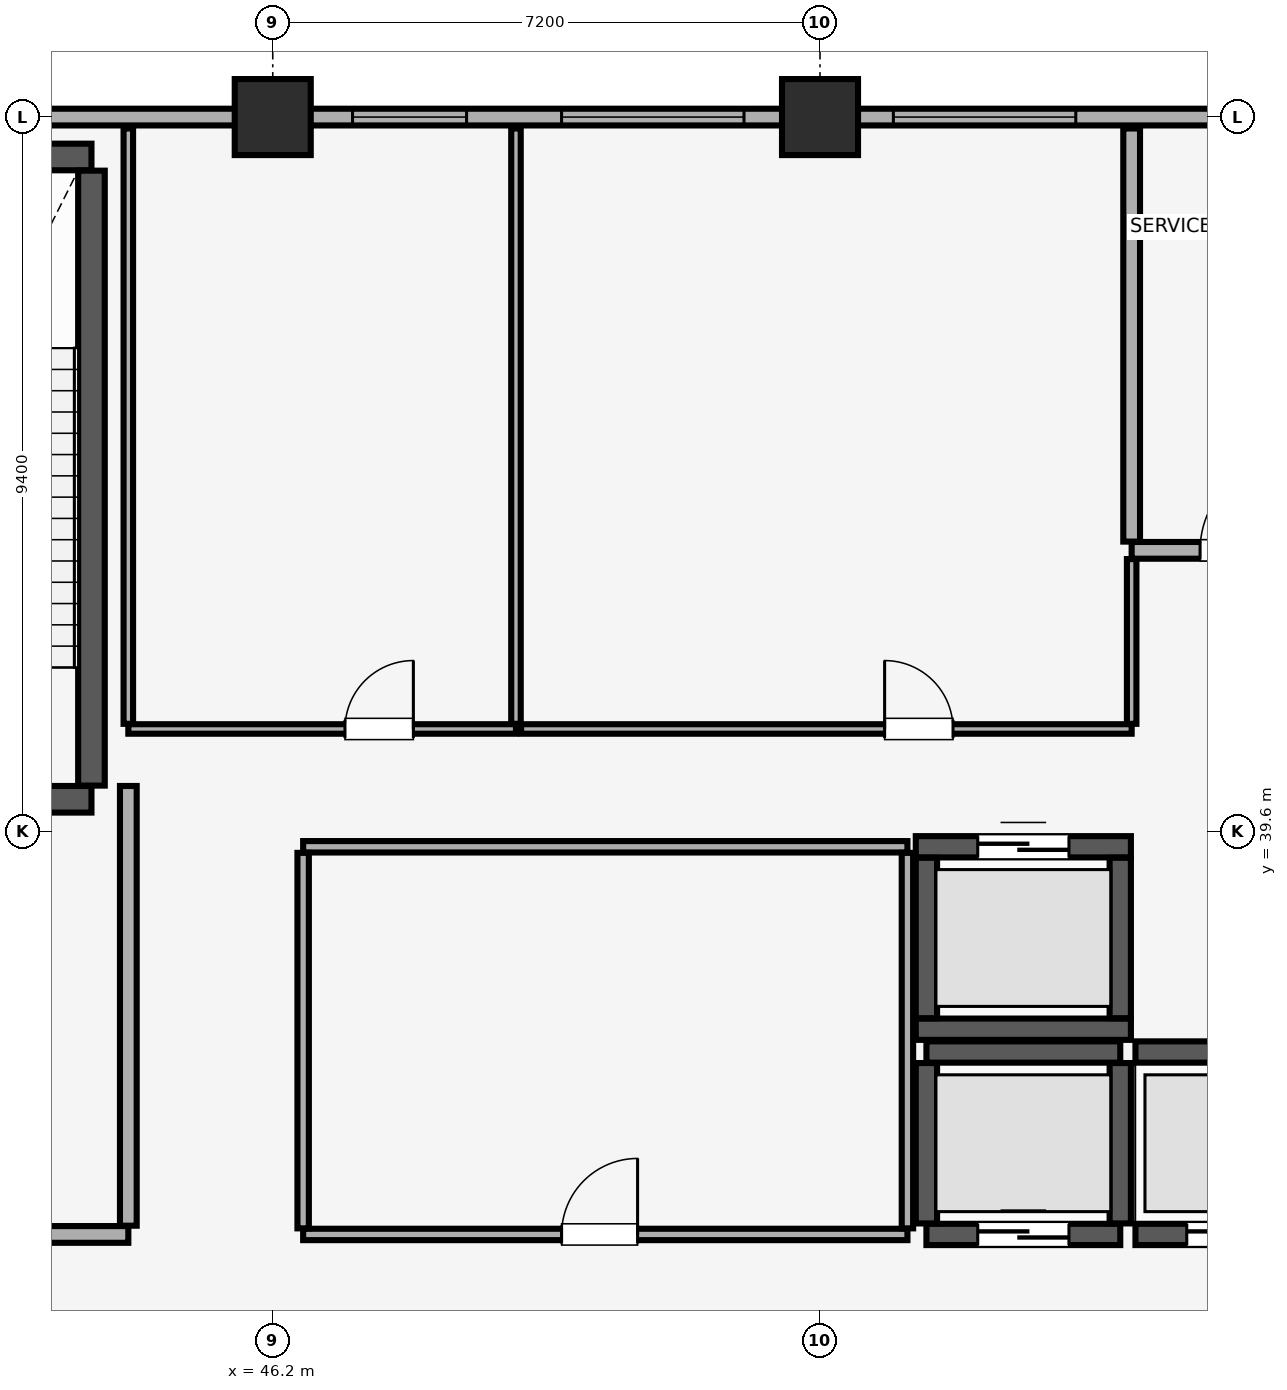
"""IFC4 building model, lengths in metres.
Left out: names, types, materials, properties, quantities, classifications, styles, units other than length and angle.
Written with IfcOpenShell. Run it as: python <this file> out.ifc"""

import sys

from ifc_helpers import new_model, si_unit, direction, frame, frame_2d, origin, origin_2d, place, context, subcontext, project, spatial, rectangle, extrude, element, fill, save


model = new_model("IFC4")
c1 = context("Model", 3, precision=1e-05, world=origin(), true_north=direction((0.0, 1.0)))
c2 = subcontext(c1, "Body", "Model", "MODEL_VIEW")
j1 = project(units=[si_unit("LENGTHUNIT", "METRE"), si_unit("PLANEANGLEUNIT", "RADIAN")], contexts=[c1])
p1 = place(None, origin())
s1 = spatial("IfcSite", under=j1, at=p1, CompositionType="ELEMENT")
p2 = place(p1, origin())
s2 = spatial("IfcBuilding", under=s1, at=p2, CompositionType="ELEMENT")
p3 = place(p2, frame((0.0, 0.0, 294.7)))
s3 = spatial("IfcBuildingStorey", under=s2, at=p3, CompositionType="ELEMENT", Elevation=294.7)
for number, where, z_axis, x_axis in (
    (1, (46.2, 49.0, 0.0), (0.0, 0.0, 1.0), (1.0, 0.0, 0.0)),
    (2, (53.4, 49.0, 0.0), (0.0, 0.0, 1.0), (1.0, 0.0, 0.0)),
):
    element("IfcColumn", number, at=place(p3, frame(where, z_axis=z_axis, x_axis=x_axis)), inside=s3, PredefinedType="COLUMN", context=c2, shape_type="SweptSolid", body=[
        extrude(rectangle(XDim=1.0, YDim=1.0, at=origin_2d()), origin(), (0.0, 0.0, 1.0), 5.12),
    ])
p4 = place(p3, frame((71.4, 49.0, 0.0), z_axis=(0.0, 0.0, 1.0), x_axis=(-1.0, 0.0, 0.0)))
e3 = element("IfcWall", 3, at=p4, inside=s3, PredefinedType="SOLIDWALL", context=c2, shape_type="SweptSolid", body=[
    extrude(rectangle(XDim=58.8, YDim=0.22, at=frame_2d((29.4, 0.0))), origin(), (0.0, 0.0, 1.0), 4.32),
])
p5 = place(p4, frame((56.365, 0.0, 0.85)))
e4 = element("IfcOpeningElement", 4, at=p5, cuts=e3, PredefinedType="OPENING", context=c2, shape_type="SweptSolid", body=[
    extrude(rectangle(XDim=1.5, YDim=1.4, at=frame_2d((0.75, 0.7))), frame((0.0, 0.12, 0.0), z_axis=(0.0, -1.0, 0.0), x_axis=(1.0, 0.0, 0.0)), (0.0, 0.0, 1.0), 0.24),
])
p6 = place(p4, frame((0.935, 0.0, 0.85)))
e5 = element("IfcOpeningElement", 5, at=p6, cuts=e3, PredefinedType="OPENING", context=c2, shape_type="SweptSolid", body=[
    extrude(rectangle(XDim=1.5, YDim=1.4, at=frame_2d((0.75, 0.7))), frame((0.0, 0.12, 0.0), z_axis=(0.0, -1.0, 0.0), x_axis=(1.0, 0.0, 0.0)), (0.0, 0.0, 1.0), 0.24),
])
p7 = place(p4, frame((43.865, 0.0, 0.9)))
e6 = element("IfcOpeningElement", 6, at=p7, cuts=e3, PredefinedType="OPENING", context=c2, shape_type="SweptSolid", body=[
    extrude(rectangle(XDim=1.5, YDim=1.4, at=frame_2d((0.75, 0.7))), frame((0.0, 0.12, 0.0), z_axis=(0.0, -1.0, 0.0), x_axis=(1.0, 0.0, 0.0)), (0.0, 0.0, 1.0), 0.24),
])
p8 = place(p4, frame((36.05, 0.0, 0.9)))
e7 = element("IfcOpeningElement", 7, at=p8, cuts=e3, PredefinedType="OPENING", context=c2, shape_type="SweptSolid", body=[
    extrude(rectangle(XDim=3.6, YDim=1.5, at=frame_2d((1.8, 0.75))), frame((0.0, 0.12, 0.0), z_axis=(0.0, -1.0, 0.0), x_axis=(1.0, 0.0, 0.0)), (0.0, 0.0, 1.0), 0.24),
])
p9 = place(p4, frame((22.65, 0.0, 0.9)))
e8 = element("IfcOpeningElement", 8, at=p9, cuts=e3, PredefinedType="OPENING", context=c2, shape_type="SweptSolid", body=[
    extrude(rectangle(XDim=1.5, YDim=1.4, at=frame_2d((0.75, 0.7))), frame((0.0, 0.12, 0.0), z_axis=(0.0, -1.0, 0.0), x_axis=(1.0, 0.0, 0.0)), (0.0, 0.0, 1.0), 0.24),
])
p10 = place(p4, frame((19.0, 0.0, 0.9)))
e9 = element("IfcOpeningElement", 9, at=p10, cuts=e3, PredefinedType="OPENING", context=c2, shape_type="SweptSolid", body=[
    extrude(rectangle(XDim=2.4, YDim=1.5, at=frame_2d((1.2, 0.75))), frame((0.0, 0.12, 0.0), z_axis=(0.0, -1.0, 0.0), x_axis=(1.0, 0.0, 0.0)), (0.0, 0.0, 1.0), 0.24),
])
p11 = place(p4, frame((14.635, 0.0, 0.9)))
e10 = element("IfcOpeningElement", 10, at=p11, cuts=e3, PredefinedType="OPENING", context=c2, shape_type="SweptSolid", body=[
    extrude(rectangle(XDim=2.4, YDim=1.5, at=frame_2d((1.2, 0.75))), frame((0.0, 0.12, 0.0), z_axis=(0.0, -1.0, 0.0), x_axis=(1.0, 0.0, 0.0)), (0.0, 0.0, 1.0), 0.24),
])
p12 = place(p3, frame((40.185, 40.025, 0.0), z_axis=(0.0, 0.0, 1.0), x_axis=(1.0, 0.0, 0.0)))
e11 = element("IfcWall", 11, at=p12, inside=s3, PredefinedType="SHEAR", context=c2, shape_type="SweptSolid", body=[
    extrude(rectangle(XDim=3.63, YDim=0.35, at=frame_2d((1.815, 0.0))), origin(), (0.0, 0.0, 1.0), 5.12),
])
p13 = place(p12, frame((1.24, 0.0, 0.0)))
e12 = element("IfcOpeningElement", 12, at=p13, cuts=e11, PredefinedType="OPENING", context=c2, shape_type="SweptSolid", body=[
    extrude(rectangle(XDim=1.15, YDim=2.15, at=frame_2d((0.575, 1.075))), frame((0.0, 0.185, 0.0), z_axis=(0.0, -1.0, 0.0), x_axis=(1.0, 0.0, 0.0)), (0.0, 0.0, 1.0), 0.37),
])
p14 = place(p3, frame((40.185, 48.475, 0.0), z_axis=(0.0, 0.0, 1.0), x_axis=(1.0, 0.0, 0.0)))
e13 = element("IfcWall", 13, at=p14, inside=s3, PredefinedType="SHEAR", context=c2, shape_type="SweptSolid", body=[
    extrude(rectangle(XDim=3.63, YDim=0.35, at=frame_2d((1.815, 0.0))), origin(), (0.0, 0.0, 1.0), 5.12),
])
p15 = place(p3, frame((43.815, 40.205, 0.0), z_axis=(0.0, 0.0, 1.0), x_axis=(0.0, 1.0, 0.0)))
e14 = element("IfcWall", 14, at=p15, inside=s3, PredefinedType="SHEAR", context=c2, shape_type="SweptSolid", body=[
    extrude(rectangle(XDim=8.09, YDim=0.35, at=frame_2d((4.045, 0.0))), origin(), (0.0, 0.0, 1.0), 5.12),
])
p16 = place(p3, frame((54.8, 34.3, 0.0), z_axis=(0.0, 0.0, 1.0), x_axis=(1.0, 0.0, 0.0)))
e15 = element("IfcWall", 15, at=p16, inside=s3, PredefinedType="SHEAR", context=c2, shape_type="SweptSolid", body=[
    extrude(rectangle(XDim=2.55, YDim=0.28, at=frame_2d((1.275, 0.0))), origin(), (0.0, 0.0, 1.0), 5.12),
])
p17 = place(p16, frame((0.675, 0.0, 0.0)))
e16 = element("IfcOpeningElement", 16, at=p17, cuts=e15, PredefinedType="OPENING", context=c2, shape_type="SweptSolid", body=[
    extrude(rectangle(XDim=1.2, YDim=2.25, at=frame_2d((0.6, 1.125))), frame((0.0, 0.15, 0.0), z_axis=(0.0, -1.0, 0.0), x_axis=(1.0, 0.0, 0.0)), (0.0, 0.0, 1.0), 0.3),
])
p18 = place(p3, frame((54.8, 36.7, 0.0), z_axis=(0.0, 0.0, 1.0), x_axis=(1.0, 0.0, 0.0)))
e17 = element("IfcWall", 17, at=p18, inside=s3, PredefinedType="SHEAR", context=c2, shape_type="SweptSolid", body=[
    extrude(rectangle(XDim=2.55, YDim=0.28, at=frame_2d((1.275, 0.0))), origin(), (0.0, 0.0, 1.0), 5.12),
])
for number, where, z_axis, x_axis in (
    (18, (54.8, 34.445, 0.0), (0.0, 0.0, 1.0), (0.0, 1.0, 0.0)),
    (19, (57.35, 34.445, 0.0), (0.0, 0.0, 1.0), (0.0, 1.0, 0.0)),
):
    element("IfcWall", number, at=place(p3, frame(where, z_axis=z_axis, x_axis=x_axis)), inside=s3, PredefinedType="SHEAR", context=c2, shape_type="SweptSolid", body=[
        extrude(rectangle(XDim=2.11, YDim=0.28, at=frame_2d((1.055, 0.0))), origin(), (0.0, 0.0, 1.0), 5.12),
    ])
p19 = place(p3, frame((57.55, 34.3, 0.0), z_axis=(0.0, 0.0, 1.0), x_axis=(1.0, 0.0, 0.0)))
e20 = element("IfcWall", 20, at=p19, inside=s3, PredefinedType="SHEAR", context=c2, shape_type="SweptSolid", body=[
    extrude(rectangle(XDim=2.55, YDim=0.28, at=frame_2d((1.275, 0.0))), origin(), (0.0, 0.0, 1.0), 5.12),
])
p20 = place(p19, frame((0.675, 0.0, 0.0)))
e21 = element("IfcOpeningElement", 21, at=p20, cuts=e20, PredefinedType="OPENING", context=c2, shape_type="SweptSolid", body=[
    extrude(rectangle(XDim=1.2, YDim=2.25, at=frame_2d((0.6, 1.125))), frame((0.0, 0.15, 0.0), z_axis=(0.0, -1.0, 0.0), x_axis=(1.0, 0.0, 0.0)), (0.0, 0.0, 1.0), 0.3),
])
p21 = place(p3, frame((57.55, 36.7, 0.0), z_axis=(0.0, 0.0, 1.0), x_axis=(1.0, 0.0, 0.0)))
e22 = element("IfcWall", 22, at=p21, inside=s3, PredefinedType="SHEAR", context=c2, shape_type="SweptSolid", body=[
    extrude(rectangle(XDim=2.55, YDim=0.28, at=frame_2d((1.275, 0.0))), origin(), (0.0, 0.0, 1.0), 5.12),
])
p22 = place(p3, frame((54.66, 37.0, 0.0), z_axis=(0.0, 0.0, 1.0), x_axis=(1.0, 0.0, 0.0)))
e23 = element("IfcWall", 23, at=p22, inside=s3, PredefinedType="SHEAR", context=c2, shape_type="SweptSolid", body=[
    extrude(rectangle(XDim=2.83, YDim=0.28, at=frame_2d((1.415, 0.0))), origin(), (0.0, 0.0, 1.0), 5.12),
])
p23 = place(p3, frame((54.66, 39.4, 0.0), z_axis=(0.0, 0.0, 1.0), x_axis=(1.0, 0.0, 0.0)))
e24 = element("IfcWall", 24, at=p23, inside=s3, PredefinedType="SHEAR", context=c2, shape_type="SweptSolid", body=[
    extrude(rectangle(XDim=2.83, YDim=0.28, at=frame_2d((1.415, 0.0))), origin(), (0.0, 0.0, 1.0), 5.12),
])
p24 = place(p23, frame((0.815, 0.0, 0.0)))
e25 = element("IfcOpeningElement", 25, at=p24, cuts=e24, PredefinedType="OPENING", context=c2, shape_type="SweptSolid", body=[
    extrude(rectangle(XDim=1.2, YDim=2.25, at=frame_2d((0.6, 1.125))), frame((0.0, 0.15, 0.0), z_axis=(0.0, -1.0, 0.0), x_axis=(1.0, 0.0, 0.0)), (0.0, 0.0, 1.0), 0.3),
])
for number, where, z_axis, x_axis in (
    (26, (54.8, 37.145, 0.0), (0.0, 0.0, 1.0), (0.0, 1.0, 0.0)),
    (27, (57.35, 37.145, 0.0), (0.0, 0.0, 1.0), (0.0, 1.0, 0.0)),
):
    element("IfcWall", number, at=place(p3, frame(where, z_axis=z_axis, x_axis=x_axis)), inside=s3, PredefinedType="SHEAR", context=c2, shape_type="SweptSolid", body=[
        extrude(rectangle(XDim=2.11, YDim=0.28, at=frame_2d((1.055, 0.0))), origin(), (0.0, 0.0, 1.0), 5.12),
    ])
p25 = place(p3, frame((39.7, 34.3, 0.0), z_axis=(0.0, 0.0, 1.0), x_axis=(1.0, 0.0, 0.0)))
e28 = element("IfcWall", 28, at=p25, inside=s3, PredefinedType="PARTITIONING", context=c2, shape_type="SweptSolid", body=[
    extrude(rectangle(XDim=4.6, YDim=0.22, at=frame_2d((2.3, 0.0))), origin(), (0.0, 0.0, 1.0), 5.12),
])
p26 = place(p25, frame((1.7, 0.0, 0.0)))
e29 = element("IfcOpeningElement", 29, at=p26, cuts=e28, PredefinedType="OPENING", context=c2, shape_type="SweptSolid", body=[
    extrude(rectangle(XDim=1.2, YDim=2.15, at=frame_2d((0.6, 1.075))), frame((0.0, 0.12, 0.0), z_axis=(0.0, -1.0, 0.0), x_axis=(1.0, 0.0, 0.0)), (0.0, 0.0, 1.0), 0.24),
])
p27 = place(p3, frame((44.3, 34.415, 0.0), z_axis=(0.0, 0.0, 1.0), x_axis=(0.0, 1.0, 0.0)))
e30 = element("IfcWall", 30, at=p27, inside=s3, PredefinedType="PARTITIONING", context=c2, shape_type="SweptSolid", body=[
    extrude(rectangle(XDim=5.785, YDim=0.22, at=frame_2d((2.893, 0.0))), origin(), (0.0, 0.0, 1.0), 5.12),
])
p28 = place(p3, frame((57.5, 43.3, 0.0), z_axis=(0.0, 0.0, 1.0), x_axis=(1.0, 0.0, 0.0)))
e31 = element("IfcWall", 31, at=p28, inside=s3, PredefinedType="PARTITIONING", context=c2, shape_type="SweptSolid", body=[
    extrude(rectangle(XDim=3.04, YDim=0.22, at=frame_2d((1.52, 0.0))), origin(), (0.0, 0.0, 1.0), 5.12),
])
p29 = place(p28, frame((0.9, 0.0, 0.0)))
e32 = element("IfcOpeningElement", 32, at=p29, cuts=e31, PredefinedType="OPENING", context=c2, shape_type="SweptSolid", body=[
    extrude(rectangle(XDim=1.2, YDim=2.15, at=frame_2d((0.6, 1.075))), frame((0.0, 0.12, 0.0), z_axis=(0.0, -1.0, 0.0), x_axis=(1.0, 0.0, 0.0)), (0.0, 0.0, 1.0), 0.24),
])
p30 = place(p3, frame((57.5, 43.415, 0.0), z_axis=(0.0, 0.0, 1.0), x_axis=(0.0, 1.0, 0.0)))
e33 = element("IfcWall", 33, at=p30, inside=s3, PredefinedType="PARTITIONING", context=c2, shape_type="SweptSolid", body=[
    extrude(rectangle(XDim=5.435, YDim=0.22, at=frame_2d((2.718, 0.0))), origin(), (0.0, 0.0, 1.0), 5.12),
])
p31 = place(p3, frame((46.6, 34.3, 0.0), z_axis=(0.0, 0.0, 1.0), x_axis=(1.0, 0.0, 0.0)))
e34 = element("IfcWall", 34, at=p31, inside=s3, PredefinedType="PARTITIONING", context=c2, shape_type="SweptSolid", body=[
    extrude(rectangle(XDim=7.95, YDim=0.15, at=frame_2d((3.975, 0.0))), origin(), (0.0, 0.0, 1.0), 5.12),
])
p32 = place(p31, frame((3.4, 0.0, 0.0)))
e35 = element("IfcOpeningElement", 35, at=p32, cuts=e34, PredefinedType="OPENING", context=c2, shape_type="SweptSolid", body=[
    extrude(rectangle(XDim=1.0, YDim=2.15, at=frame_2d((0.5, 1.075))), frame((0.0, 0.085, 0.0), z_axis=(0.0, -1.0, 0.0), x_axis=(1.0, 0.0, 0.0)), (0.0, 0.0, 1.0), 0.17),
])
p33 = place(p3, frame((46.6, 39.4, 0.0), z_axis=(0.0, 0.0, 1.0), x_axis=(1.0, 0.0, 0.0)))
e36 = element("IfcWall", 36, at=p33, inside=s3, PredefinedType="PARTITIONING", context=c2, shape_type="SweptSolid", body=[
    extrude(rectangle(XDim=7.95, YDim=0.15, at=frame_2d((3.975, 0.0))), origin(), (0.0, 0.0, 1.0), 5.12),
])
for number, where, z_axis, x_axis in (
    (37, (46.6, 34.38, 0.0), (0.0, 0.0, 1.0), (0.0, 1.0, 0.0)),
    (38, (54.55, 34.38, 0.0), (0.0, 0.0, 1.0), (0.0, 1.0, 0.0)),
):
    element("IfcWall", number, at=place(p3, frame(where, z_axis=z_axis, x_axis=x_axis)), inside=s3, PredefinedType="PARTITIONING", context=c2, shape_type="SweptSolid", body=[
        extrude(rectangle(XDim=4.94, YDim=0.15, at=frame_2d((2.47, 0.0))), origin(), (0.0, 0.0, 1.0), 5.12),
    ])
p34 = place(p3, frame((44.3, 40.95, 0.0), z_axis=(0.0, 0.0, 1.0), x_axis=(1.0, 0.0, 0.0)))
e39 = element("IfcWall", 39, at=p34, inside=s3, PredefinedType="PARTITIONING", context=c2, shape_type="SweptSolid", body=[
    extrude(rectangle(XDim=5.1, YDim=0.125, at=frame_2d((2.55, 0.0))), origin(), (0.0, 0.0, 1.0), 5.12),
])
p35 = place(p34, frame((2.85, 0.0, 0.0)))
e40 = element("IfcOpeningElement", 40, at=p35, cuts=e39, PredefinedType="OPENING", context=c2, shape_type="SweptSolid", body=[
    extrude(rectangle(XDim=0.9, YDim=2.1, at=frame_2d((0.45, 1.05))), frame((0.0, 0.073, 0.0), z_axis=(0.0, -1.0, 0.0), x_axis=(1.0, 0.0, 0.0)), (0.0, 0.0, 1.0), 0.145),
])
for number, where, z_axis, x_axis in (
    (41, (44.3, 41.018, 0.0), (0.0, 0.0, 1.0), (0.0, 1.0, 0.0)),
    (42, (49.4, 41.018, 0.0), (0.0, 0.0, 1.0), (0.0, 1.0, 0.0)),
):
    element("IfcWall", number, at=place(p3, frame(where, z_axis=z_axis, x_axis=x_axis)), inside=s3, PredefinedType="PARTITIONING", context=c2, shape_type="SweptSolid", body=[
        extrude(rectangle(XDim=7.833, YDim=0.125, at=frame_2d((3.916, 0.0))), origin(), (0.0, 0.0, 1.0), 5.12),
    ])
p36 = place(p3, frame((49.468, 40.95, 0.0), z_axis=(0.0, 0.0, 1.0), x_axis=(1.0, 0.0, 0.0)))
e43 = element("IfcWall", 43, at=p36, inside=s3, PredefinedType="PARTITIONING", context=c2, shape_type="SweptSolid", body=[
    extrude(rectangle(XDim=8.032, YDim=0.125, at=frame_2d((4.016, 0.0))), origin(), (0.0, 0.0, 1.0), 5.12),
])
p37 = place(p36, frame((4.782, 0.0, 0.0)))
e44 = element("IfcOpeningElement", 44, at=p37, cuts=e43, PredefinedType="OPENING", context=c2, shape_type="SweptSolid", body=[
    extrude(rectangle(XDim=0.9, YDim=2.1, at=frame_2d((0.45, 1.05))), frame((0.0, 0.073, 0.0), z_axis=(0.0, -1.0, 0.0), x_axis=(1.0, 0.0, 0.0)), (0.0, 0.0, 1.0), 0.145),
])
p38 = place(p3, frame((57.5, 41.018, 0.0), z_axis=(0.0, 0.0, 1.0), x_axis=(0.0, 1.0, 0.0)))
e45 = element("IfcWall", 45, at=p38, inside=s3, PredefinedType="PARTITIONING", context=c2, shape_type="SweptSolid", body=[
    extrude(rectangle(XDim=2.167, YDim=0.125, at=frame_2d((1.084, 0.0))), origin(), (0.0, 0.0, 1.0), 5.12),
])
p39 = place(p9, origin())
e46 = element("IfcWindow", 46, at=p39, inside=s3, PartitioningType="SINGLE_PANEL", PredefinedType="WINDOW", context=c2, shape_type="SweptSolid", body=[
    extrude(rectangle(XDim=1.5, YDim=1.4, at=frame_2d((0.75, 0.7))), frame((0.0, 0.03, 0.0), z_axis=(0.0, -1.0, 0.0), x_axis=(1.0, 0.0, 0.0)), (0.0, 0.0, 1.0), 0.06),
])
fill(e8, e46)
p40 = place(p10, origin())
e47 = element("IfcWindow", 47, at=p40, inside=s3, PartitioningType="SINGLE_PANEL", PredefinedType="WINDOW", context=c2, shape_type="SweptSolid", body=[
    extrude(rectangle(XDim=2.4, YDim=1.5, at=frame_2d((1.2, 0.75))), frame((0.0, 0.03, 0.0), z_axis=(0.0, -1.0, 0.0), x_axis=(1.0, 0.0, 0.0)), (0.0, 0.0, 1.0), 0.06),
])
fill(e9, e47)
p41 = place(p11, origin())
e48 = element("IfcWindow", 48, at=p41, inside=s3, PartitioningType="SINGLE_PANEL", PredefinedType="WINDOW", context=c2, shape_type="SweptSolid", body=[
    extrude(rectangle(XDim=2.4, YDim=1.5, at=frame_2d((1.2, 0.75))), frame((0.0, 0.03, 0.0), z_axis=(0.0, -1.0, 0.0), x_axis=(1.0, 0.0, 0.0)), (0.0, 0.0, 1.0), 0.06),
])
fill(e10, e48)
p42 = place(p17, origin())
e49 = element("IfcDoor", 49, at=p42, inside=s3, OperationType="DOUBLE_DOOR_SLIDING", PredefinedType="DOOR", context=c2, shape_type="SweptSolid", body=[
    extrude(rectangle(XDim=1.2, YDim=2.25, at=frame_2d((0.6, 1.125))), frame((0.0, 0.025, 0.0), z_axis=(0.0, -1.0, 0.0), x_axis=(1.0, 0.0, 0.0)), (0.0, 0.0, 1.0), 0.05),
])
fill(e16, e49)
p43 = place(p20, origin())
e50 = element("IfcDoor", 50, at=p43, inside=s3, OperationType="DOUBLE_DOOR_SLIDING", PredefinedType="DOOR", context=c2, shape_type="SweptSolid", body=[
    extrude(rectangle(XDim=1.2, YDim=2.25, at=frame_2d((0.6, 1.125))), frame((0.0, 0.025, 0.0), z_axis=(0.0, -1.0, 0.0), x_axis=(1.0, 0.0, 0.0)), (0.0, 0.0, 1.0), 0.05),
])
fill(e21, e50)
p44 = place(p24, origin())
e51 = element("IfcDoor", 51, at=p44, inside=s3, OperationType="DOUBLE_DOOR_SLIDING", PredefinedType="DOOR", context=c2, shape_type="SweptSolid", body=[
    extrude(rectangle(XDim=1.2, YDim=2.25, at=frame_2d((0.6, 1.125))), frame((0.0, 0.025, 0.0), z_axis=(0.0, -1.0, 0.0), x_axis=(1.0, 0.0, 0.0)), (0.0, 0.0, 1.0), 0.05),
])
fill(e25, e51)
p45 = place(p29, origin())
e52 = element("IfcDoor", 52, at=p45, inside=s3, OperationType="SINGLE_SWING_RIGHT", PredefinedType="DOOR", context=c2, shape_type="SweptSolid", body=[
    extrude(rectangle(XDim=1.2, YDim=2.15, at=frame_2d((0.6, 1.075))), frame((0.0, 0.025, 0.0), z_axis=(0.0, -1.0, 0.0), x_axis=(1.0, 0.0, 0.0)), (0.0, 0.0, 1.0), 0.05),
])
fill(e32, e52)
p46 = place(p32, origin())
e53 = element("IfcDoor", 53, at=p46, inside=s3, OperationType="SINGLE_SWING_RIGHT", PredefinedType="DOOR", context=c2, shape_type="SweptSolid", body=[
    extrude(rectangle(XDim=1.0, YDim=2.15, at=frame_2d((0.5, 1.075))), frame((0.0, 0.025, 0.0), z_axis=(0.0, -1.0, 0.0), x_axis=(1.0, 0.0, 0.0)), (0.0, 0.0, 1.0), 0.05),
])
fill(e35, e53)
p47 = place(p35, origin())
e54 = element("IfcDoor", 54, at=p47, inside=s3, OperationType="SINGLE_SWING_RIGHT", PredefinedType="DOOR", context=c2, shape_type="SweptSolid", body=[
    extrude(rectangle(XDim=0.9, YDim=2.1, at=frame_2d((0.45, 1.05))), frame((0.0, 0.025, 0.0), z_axis=(0.0, -1.0, 0.0), x_axis=(1.0, 0.0, 0.0)), (0.0, 0.0, 1.0), 0.05),
])
fill(e40, e54)
p48 = place(p37, origin())
e55 = element("IfcDoor", 55, at=p48, inside=s3, OperationType="SINGLE_SWING_LEFT", PredefinedType="DOOR", context=c2, shape_type="SweptSolid", body=[
    extrude(rectangle(XDim=0.9, YDim=2.1, at=frame_2d((0.45, 1.05))), frame((0.0, 0.025, 0.0), z_axis=(0.0, -1.0, 0.0), x_axis=(1.0, 0.0, 0.0)), (0.0, 0.0, 1.0), 0.05),
])
fill(e44, e55)
save(model, sys.argv[1])
